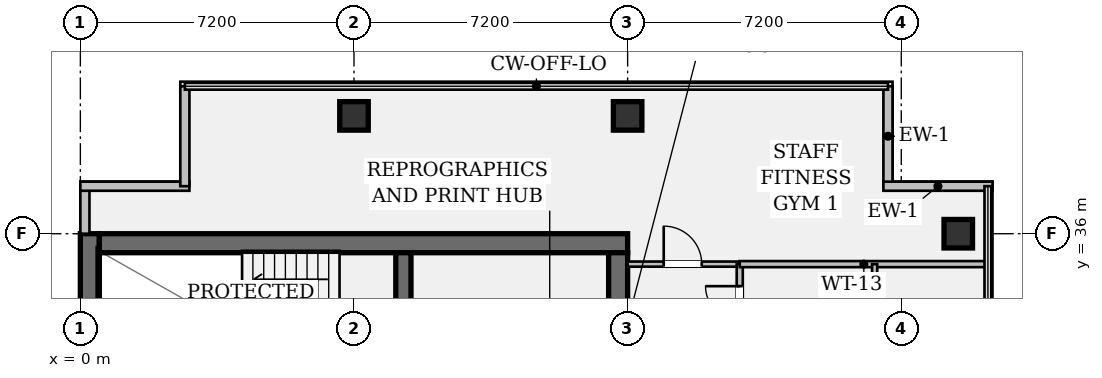
"""IFC4 building model, lengths in metres.
Left out: names, types, materials, properties, quantities, classifications, styles, units other than length and angle.
Written with IfcOpenShell. Run it as: python <this file> out.ifc"""

import sys

from ifc_helpers import new_model, si_unit, direction, frame, frame_2d, origin, origin_2d, place, context, subcontext, project, spatial, rectangle, hollow_rectangle, extrude, element, fill, save


model = new_model("IFC4")
c1 = context("Model", 3, precision=1e-05, world=origin(), true_north=direction((0.0, 1.0)))
c2 = subcontext(c1, "Body", "Model", "MODEL_VIEW")
j1 = project(units=[si_unit("LENGTHUNIT", "METRE"), si_unit("PLANEANGLEUNIT", "RADIAN")], contexts=[c1])
p1 = place(None, origin())
s1 = spatial("IfcSite", under=j1, at=p1, CompositionType="ELEMENT")
p2 = place(p1, origin())
s2 = spatial("IfcBuilding", under=s1, at=p2, CompositionType="ELEMENT")
p3 = place(p2, frame((0.0, 0.0, 211.75)))
s3 = spatial("IfcBuildingStorey", under=s2, at=p3, CompositionType="ELEMENT", Elevation=211.75)
p4 = place(p3, frame((0.25, 7.2, 0.0), z_axis=(0.0, 0.0, 1.0), x_axis=(0.0, 1.0, 0.0)))
e1 = element("IfcWall", 1, at=p4, inside=s3, PredefinedType="SHEAR", context=c2, shape_type="SweptSolid", body=[
    extrude(rectangle(XDim=28.8, YDim=0.5, at=frame_2d((14.4, 0.0))), origin(), (0.0, 0.0, 1.0), 3.24),
])
p5 = place(p3, frame((0.5, 35.75, 0.0), z_axis=(0.0, 0.0, 1.0), x_axis=(1.0, 0.0, 0.0)))
e2 = element("IfcWall", 2, at=p5, inside=s3, PredefinedType="SHEAR", context=c2, shape_type="SweptSolid", body=[
    extrude(rectangle(XDim=13.9, YDim=0.5, at=frame_2d((6.95, 0.0))), origin(), (0.0, 0.0, 1.0), 3.24),
])
p6 = place(p3, frame((14.15, 35.5, 0.0), z_axis=(0.0, 0.0, 1.0), x_axis=(0.0, -1.0, 0.0)))
e3 = element("IfcWall", 3, at=p6, inside=s3, PredefinedType="SHEAR", context=c2, shape_type="SweptSolid", body=[
    extrude(rectangle(XDim=27.8, YDim=0.5, at=frame_2d((13.9, 0.0))), origin(), (0.0, 0.0, 1.0), 3.24),
])
p7 = place(p6, frame((1.4, 0.0, 0.0)))
e4 = element("IfcOpeningElement", 4, at=p7, cuts=e3, PredefinedType="OPENING", context=c2, shape_type="SweptSolid", body=[
    extrude(rectangle(XDim=1.2, YDim=2.15, at=frame_2d((0.6, 1.075))), frame((0.0, 0.262, 0.0), z_axis=(0.0, -1.0, 0.0), x_axis=(1.0, 0.0, 0.0)), (0.0, 0.0, 1.0), 0.524),
])
p8 = place(p6, frame((25.35, 0.0, 0.0)))
e5 = element("IfcOpeningElement", 5, at=p8, cuts=e3, PredefinedType="OPENING", context=c2, shape_type="SweptSolid", body=[
    extrude(rectangle(XDim=1.2, YDim=2.15, at=frame_2d((0.6, 1.075))), frame((0.0, 0.262, 0.0), z_axis=(0.0, -1.0, 0.0), x_axis=(1.0, 0.0, 0.0)), (0.0, 0.0, 1.0), 0.524),
])
p9 = place(p6, frame((14.7, 0.0, 0.0)))
e6 = element("IfcOpeningElement", 6, at=p9, cuts=e3, PredefinedType="OPENING", context=c2, shape_type="SweptSolid", body=[
    extrude(rectangle(XDim=1.6, YDim=2.2, at=frame_2d((0.8, 1.1))), frame((0.0, 0.262, 0.0), z_axis=(0.0, -1.0, 0.0), x_axis=(1.0, 0.0, 0.0)), (0.0, 0.0, 1.0), 0.524),
])
p10 = place(p3, frame((8.5, 31.72, 0.0), z_axis=(0.0, 0.0, 1.0), x_axis=(0.0, 1.0, 0.0)))
e7 = element("IfcWall", 7, at=p10, inside=s3, PredefinedType="SHEAR", context=c2, shape_type="SweptSolid", body=[
    extrude(rectangle(XDim=3.78, YDim=0.4, at=frame_2d((1.89, 0.0))), origin(), (0.0, 0.0, 1.0), 3.24),
])
p11 = place(p10, frame((0.9, 0.0, 0.0)))
e8 = element("IfcOpeningElement", 8, at=p11, cuts=e7, PredefinedType="OPENING", context=c2, shape_type="SweptSolid", body=[
    extrude(rectangle(XDim=1.1, YDim=2.15, at=frame_2d((0.55, 1.075))), frame((0.0, 0.212, 0.0), z_axis=(0.0, -1.0, 0.0), x_axis=(1.0, 0.0, 0.0)), (0.0, 0.0, 1.0), 0.424),
])
for number, where, z_axis, x_axis in (
    (9, (7.2, 39.1, 0.0), (0.0, 0.0, 1.0), (1.0, 0.0, 0.0)),
    (10, (14.4, 39.1, 0.0), (0.0, 0.0, 1.0), (1.0, 0.0, 0.0)),
    (11, (23.1, 36.0, 0.0), (0.0, 0.0, 1.0), (1.0, 0.0, 0.0)),
):
    element("IfcColumn", number, at=place(p3, frame(where, z_axis=z_axis, x_axis=x_axis)), inside=s3, PredefinedType="COLUMN", context=c2, shape_type="SweptSolid", body=[
        extrude(hollow_rectangle(XDim=0.75, YDim=0.75, WallThickness=0.045, at=origin_2d()), origin(), (0.0, 0.0, 1.0), 3.24),
    ])
p12 = place(p3, frame((0.12, 36.0, 0.0), z_axis=(0.0, 0.0, 1.0), x_axis=(0.0, 1.0, 0.0)))
e12 = element("IfcWall", 12, at=p12, inside=s3, PredefinedType="STANDARD", context=c2, shape_type="SweptSolid", body=[
    extrude(rectangle(XDim=1.25, YDim=0.24, at=frame_2d((0.625, 0.0))), origin(), (0.0, 0.0, 1.0), 3.24),
])
p13 = place(p3, frame((0.0, 37.25, 0.0), z_axis=(0.0, 0.0, 1.0), x_axis=(1.0, 0.0, 0.0)))
e13 = element("IfcWall", 13, at=p13, inside=s3, PredefinedType="STANDARD", context=c2, shape_type="SweptSolid", body=[
    extrude(rectangle(XDim=2.87, YDim=0.24, at=frame_2d((1.435, 0.0))), origin(), (0.0, 0.0, 1.0), 3.24),
])
for number, where, z_axis, x_axis in (
    (14, (2.75, 37.25, 0.0), (0.0, 0.0, 1.0), (0.0, 1.0, 0.0)),
    (15, (21.25, 39.88, 0.0), (0.0, 0.0, 1.0), (0.0, -1.0, 0.0)),
):
    element("IfcWall", number, at=place(p3, frame(where, z_axis=z_axis, x_axis=x_axis)), inside=s3, PredefinedType="STANDARD", context=c2, shape_type="SweptSolid", body=[
        extrude(rectangle(XDim=2.63, YDim=0.24, at=frame_2d((1.315, 0.0))), origin(), (0.0, 0.0, 1.0), 3.24),
    ])
p14 = place(p3, frame((21.13, 37.25, 0.0), z_axis=(0.0, 0.0, 1.0), x_axis=(1.0, 0.0, 0.0)))
e16 = element("IfcWall", 16, at=p14, inside=s3, PredefinedType="STANDARD", context=c2, shape_type="SweptSolid", body=[
    extrude(rectangle(XDim=2.87, YDim=0.24, at=frame_2d((1.435, 0.0))), origin(), (0.0, 0.0, 1.0), 3.24),
])
p15 = place(p3, frame((14.4, 35.2, 0.0), z_axis=(0.0, 0.0, 1.0), x_axis=(1.0, 0.0, 0.0)))
e17 = element("IfcWall", 17, at=p15, inside=s3, PredefinedType="PARTITIONING", context=c2, shape_type="SweptSolid", body=[
    extrude(rectangle(XDim=2.95, YDim=0.135, at=frame_2d((1.475, 0.0))), origin(), (0.0, 0.0, 1.0), 2.808),
])
p16 = place(p15, frame((0.95, 0.0, 0.0)))
e18 = element("IfcOpeningElement", 18, at=p16, cuts=e17, PredefinedType="OPENING", context=c2, shape_type="SweptSolid", body=[
    extrude(rectangle(XDim=1.0, YDim=2.15, at=frame_2d((0.5, 1.075))), frame((0.0, 0.08, 0.0), z_axis=(0.0, -1.0, 0.0), x_axis=(1.0, 0.0, 0.0)), (0.0, 0.0, 1.0), 0.159),
])
p17 = place(p3, frame((17.35, 17.75, 0.0), z_axis=(0.0, 0.0, 1.0), x_axis=(0.0, 1.0, 0.0)))
e19 = element("IfcWall", 19, at=p17, inside=s3, PredefinedType="PARTITIONING", context=c2, shape_type="SweptSolid", body=[
    extrude(rectangle(XDim=17.45, YDim=0.16, at=frame_2d((8.725, 0.0))), origin(), (0.0, 0.0, 1.0), 2.613),
])
p18 = place(p17, frame((6.23, 0.0, 0.0)))
e20 = element("IfcOpeningElement", 20, at=p18, cuts=e19, PredefinedType="OPENING", context=c2, shape_type="SweptSolid", body=[
    extrude(rectangle(XDim=0.9, YDim=2.15, at=frame_2d((0.45, 1.075))), frame((0.0, 0.092, 0.0), z_axis=(0.0, -1.0, 0.0), x_axis=(1.0, 0.0, 0.0)), (0.0, 0.0, 1.0), 0.184),
])
p19 = place(p17, frame((9.48, 0.0, 0.0)))
e21 = element("IfcOpeningElement", 21, at=p19, cuts=e19, PredefinedType="OPENING", context=c2, shape_type="SweptSolid", body=[
    extrude(rectangle(XDim=0.9, YDim=2.15, at=frame_2d((0.45, 1.075))), frame((0.0, 0.092, 0.0), z_axis=(0.0, -1.0, 0.0), x_axis=(1.0, 0.0, 0.0)), (0.0, 0.0, 1.0), 0.184),
])
p20 = place(p17, frame((12.73, 0.0, 0.0)))
e22 = element("IfcOpeningElement", 22, at=p20, cuts=e19, PredefinedType="OPENING", context=c2, shape_type="SweptSolid", body=[
    extrude(rectangle(XDim=0.9, YDim=2.15, at=frame_2d((0.45, 1.075))), frame((0.0, 0.092, 0.0), z_axis=(0.0, -1.0, 0.0), x_axis=(1.0, 0.0, 0.0)), (0.0, 0.0, 1.0), 0.184),
])
p21 = place(p17, frame((15.97, 0.0, 0.0)))
e23 = element("IfcOpeningElement", 23, at=p21, cuts=e19, PredefinedType="OPENING", context=c2, shape_type="SweptSolid", body=[
    extrude(rectangle(XDim=0.9, YDim=2.15, at=frame_2d((0.45, 1.075))), frame((0.0, 0.092, 0.0), z_axis=(0.0, -1.0, 0.0), x_axis=(1.0, 0.0, 0.0)), (0.0, 0.0, 1.0), 0.184),
])
p22 = place(p3, frame((17.35, 35.2, 0.0), z_axis=(0.0, 0.0, 1.0), x_axis=(1.0, 0.0, 0.0)))
e24 = element("IfcWall", 24, at=p22, inside=s3, PredefinedType="PARTITIONING", context=c2, shape_type="SweptSolid", body=[
    extrude(rectangle(XDim=6.53, YDim=0.16, at=frame_2d((3.265, 0.0))), origin(), (0.0, 0.0, 1.0), 2.758),
])
p23 = place(p3, frame((20.9, 22.7, 0.0), z_axis=(0.0, 0.0, 1.0), x_axis=(0.0, 1.0, 0.0)))
e25 = element("IfcWall", 25, at=p23, inside=s3, PredefinedType="PARTITIONING", context=c2, shape_type="SweptSolid", body=[
    extrude(rectangle(XDim=12.5, YDim=0.135, at=frame_2d((6.25, 0.0))), origin(), (0.0, 0.0, 1.0), 2.613),
])
p24 = place(p16, origin())
e26 = element("IfcDoor", 26, at=p24, inside=s3, OperationType="SINGLE_SWING_LEFT", PredefinedType="DOOR", context=c2, shape_type="SweptSolid", body=[
    extrude(rectangle(XDim=1.0, YDim=2.15, at=frame_2d((0.5, 1.075))), frame((0.0, 0.025, 0.0), z_axis=(0.0, -1.0, 0.0), x_axis=(1.0, 0.0, 0.0)), (0.0, 0.0, 1.0), 0.05),
])
fill(e18, e26)
p25 = place(p21, origin())
e27 = element("IfcDoor", 27, at=p25, inside=s3, OperationType="SINGLE_SWING_RIGHT", PredefinedType="DOOR", context=c2, shape_type="SweptSolid", body=[
    extrude(rectangle(XDim=0.9, YDim=2.15, at=frame_2d((0.45, 1.075))), frame((0.0, 0.025, 0.0), z_axis=(0.0, -1.0, 0.0), x_axis=(1.0, 0.0, 0.0)), (0.0, 0.0, 1.0), 0.05),
])
fill(e23, e27)
save(model, sys.argv[1])
